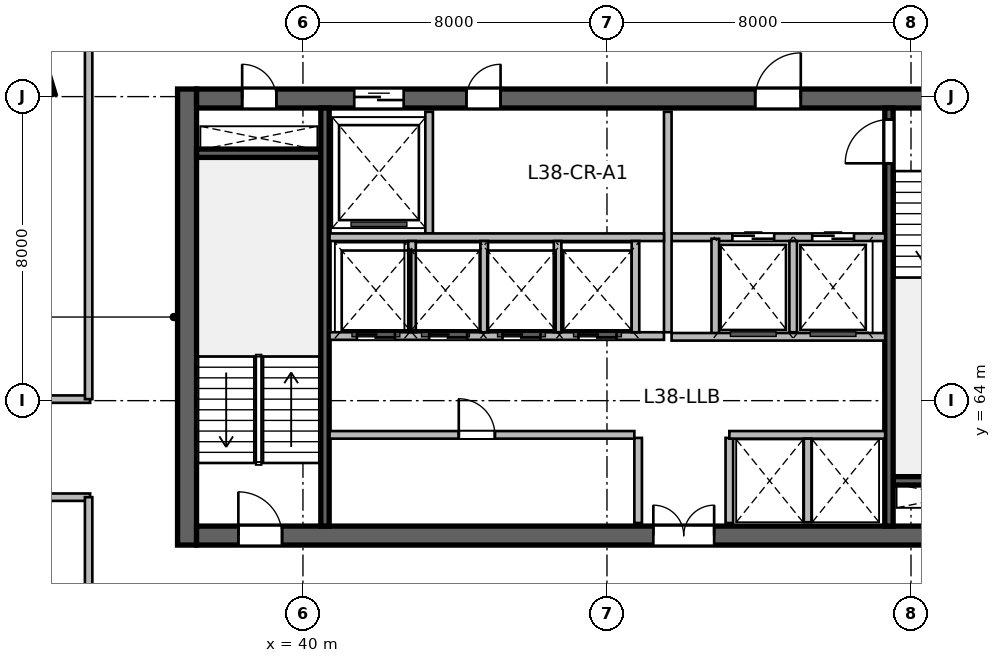
"""IFC4 building model, lengths in metres.
Left out: names, types, materials, properties, quantities, classifications, styles, units other than length and angle.
Written with IfcOpenShell. Run it as: python <this file> out.ifc"""

import sys

from ifc_helpers import new_model, si_unit, direction, frame, frame_2d, origin, origin_2d, place, context, subcontext, project, spatial, rectangle, extrude, source, transform, mapped, element, fill, save


model = new_model("IFC4")
c1 = context("Model", 3, precision=1e-05, world=origin(), true_north=direction((0.0, 1.0)))
c2 = subcontext(c1, "Body", "Model", "MODEL_VIEW")
j1 = project(units=[si_unit("LENGTHUNIT", "METRE"), si_unit("PLANEANGLEUNIT", "RADIAN")], contexts=[c1])
p1 = place(None, origin())
s1 = spatial("IfcSite", under=j1, at=p1, CompositionType="ELEMENT")
p2 = place(p1, origin())
s2 = spatial("IfcBuilding", under=s1, at=p2, CompositionType="ELEMENT")
p3 = place(p2, frame((0.0, 0.0, 158.4)))
s3 = spatial("IfcBuildingStorey", under=s2, at=p3, CompositionType="ELEMENT", Elevation=158.4)
m1 = source(origin(), c2, "Body", "SweptSolid", [
    extrude(rectangle(XDim=12.0, YDim=0.5, at=frame_2d((6.0, 0.0))), origin(), (0.0, 0.0, 1.0), 3.9),
])
p4 = place(p3, frame((36.95, 60.2, 0.0), z_axis=(0.0, 0.0, 1.0), x_axis=(0.0, 1.0, 0.0)))
e1 = element("IfcWall", 1, at=p4, inside=s3, PredefinedType="SHEAR", context=c2, shape_type="MappedRepresentation", body=[
    mapped(m1, transform((0.0, 0.0, 0.0), scale=1.0)),
])
m2 = source(origin(), c2, "Body", "SweptSolid", [
    extrude(rectangle(XDim=21.6, YDim=0.5, at=frame_2d((10.8, 0.0))), origin(), (0.0, 0.0, 1.0), 3.9),
])
p5 = place(p3, frame((37.2, 60.45, 0.0), z_axis=(0.0, 0.0, 1.0), x_axis=(1.0, 0.0, 0.0)))
e2 = element("IfcWall", 2, at=p5, inside=s3, PredefinedType="SHEAR", context=c2, shape_type="MappedRepresentation", body=[
    mapped(m2, transform((0.0, 0.0, 0.0), scale=1.0)),
])
p6 = place(p5, frame((1.1, 0.0, 0.0)))
e3 = element("IfcOpeningElement", 3, at=p6, cuts=e2, PredefinedType="OPENING", context=c2, shape_type="SweptSolid", body=[
    extrude(rectangle(XDim=1.15, YDim=2.15, at=frame_2d((0.575, 1.075))), frame((0.0, 0.26, 0.0), z_axis=(0.0, -1.0, 0.0), x_axis=(1.0, 0.0, 0.0)), (0.0, 0.0, 1.0), 0.52),
])
p7 = place(p5, frame((19.5, 0.0, 0.0)))
e4 = element("IfcOpeningElement", 4, at=p7, cuts=e2, PredefinedType="OPENING", context=c2, shape_type="SweptSolid", body=[
    extrude(rectangle(XDim=0.9, YDim=2.1, at=frame_2d((0.45, 1.05))), frame((0.0, 0.26, 0.0), z_axis=(0.0, -1.0, 0.0), x_axis=(1.0, 0.0, 0.0)), (0.0, 0.0, 1.0), 0.52),
])
p8 = place(p5, frame((12.02, 0.0, 0.0)))
e5 = element("IfcOpeningElement", 5, at=p8, cuts=e2, PredefinedType="OPENING", context=c2, shape_type="SweptSolid", body=[
    extrude(rectangle(XDim=1.6, YDim=2.15, at=frame_2d((0.8, 1.075))), frame((0.0, 0.26, 0.0), z_axis=(0.0, -1.0, 0.0), x_axis=(1.0, 0.0, 0.0)), (0.0, 0.0, 1.0), 0.52),
])
p9 = place(p3, frame((37.2, 71.95, 0.0), z_axis=(0.0, 0.0, 1.0), x_axis=(1.0, 0.0, 0.0)))
e6 = element("IfcWall", 6, at=p9, inside=s3, PredefinedType="SHEAR", context=c2, shape_type="MappedRepresentation", body=[
    mapped(m2, transform((0.0, 0.0, 0.0), scale=1.0)),
])
p10 = place(p9, frame((1.2, 0.0, 0.0)))
e7 = element("IfcOpeningElement", 7, at=p10, cuts=e6, PredefinedType="OPENING", context=c2, shape_type="SweptSolid", body=[
    extrude(rectangle(XDim=0.9, YDim=2.1, at=frame_2d((0.45, 1.05))), frame((0.0, 0.26, 0.0), z_axis=(0.0, -1.0, 0.0), x_axis=(1.0, 0.0, 0.0)), (0.0, 0.0, 1.0), 0.52),
])
p11 = place(p9, frame((14.7, 0.0, 0.0)))
e8 = element("IfcOpeningElement", 8, at=p11, cuts=e6, PredefinedType="OPENING", context=c2, shape_type="SweptSolid", body=[
    extrude(rectangle(XDim=1.2, YDim=2.15, at=frame_2d((0.6, 1.075))), frame((0.0, 0.26, 0.0), z_axis=(0.0, -1.0, 0.0), x_axis=(1.0, 0.0, 0.0)), (0.0, 0.0, 1.0), 0.52),
])
p12 = place(p9, frame((4.15, 0.0, 0.0)))
e9 = element("IfcOpeningElement", 9, at=p12, cuts=e6, PredefinedType="OPENING", context=c2, shape_type="SweptSolid", body=[
    extrude(rectangle(XDim=1.3, YDim=2.15, at=frame_2d((0.65, 1.075))), frame((0.0, 0.26, 0.0), z_axis=(0.0, -1.0, 0.0), x_axis=(1.0, 0.0, 0.0)), (0.0, 0.0, 1.0), 0.52),
])
p13 = place(p9, frame((7.1, 0.0, 0.0)))
e10 = element("IfcOpeningElement", 10, at=p13, cuts=e6, PredefinedType="OPENING", context=c2, shape_type="SweptSolid", body=[
    extrude(rectangle(XDim=0.9, YDim=2.1, at=frame_2d((0.45, 1.05))), frame((0.0, 0.26, 0.0), z_axis=(0.0, -1.0, 0.0), x_axis=(1.0, 0.0, 0.0)), (0.0, 0.0, 1.0), 0.52),
])
m3 = source(origin(), c2, "Body", "SweptSolid", [
    extrude(rectangle(XDim=3.27, YDim=0.22, at=frame_2d((1.635, 0.0))), origin(), (0.0, 0.0, 1.0), 3.9),
])
for number, where, z_axis, x_axis in (
    (11, (37.2, 70.51, 0.0), (0.0, 0.0, 1.0), (1.0, 0.0, 0.0)),
    (12, (55.53, 61.89, 0.0), (0.0, 0.0, 1.0), (1.0, 0.0, 0.0)),
):
    element("IfcWall", number, at=place(p3, frame(where, z_axis=z_axis, x_axis=x_axis)), inside=s3, PredefinedType="SHEAR", context=c2, shape_type="MappedRepresentation", body=[
        mapped(m3, transform((0.0, 0.0, 0.0), scale=1.0)),
    ])
m4 = source(origin(), c2, "Body", "SweptSolid", [
    extrude(rectangle(XDim=11.0, YDim=0.22, at=frame_2d((5.5, 0.0))), origin(), (0.0, 0.0, 1.0), 3.9),
])
p14 = place(p3, frame((40.58, 60.7, 0.0), z_axis=(0.0, 0.0, 1.0), x_axis=(0.0, 1.0, 0.0)))
e13 = element("IfcWall", 13, at=p14, inside=s3, PredefinedType="SHEAR", context=c2, shape_type="MappedRepresentation", body=[
    mapped(m4, transform((0.0, 0.0, 0.0), scale=1.0)),
])
p15 = place(p3, frame((55.42, 60.7, 0.0), z_axis=(0.0, 0.0, 1.0), x_axis=(0.0, 1.0, 0.0)))
e14 = element("IfcWall", 14, at=p15, inside=s3, PredefinedType="SHEAR", context=c2, shape_type="MappedRepresentation", body=[
    mapped(m4, transform((0.0, 0.0, 0.0), scale=1.0)),
])
p16 = place(p15, frame((9.545, 0.0, 0.0)))
e15 = element("IfcOpeningElement", 15, at=p16, cuts=e14, PredefinedType="OPENING", context=c2, shape_type="SweptSolid", body=[
    extrude(rectangle(XDim=1.15, YDim=2.15, at=frame_2d((0.575, 1.075))), frame((0.0, 0.12, 0.0), z_axis=(0.0, -1.0, 0.0), x_axis=(1.0, 0.0, 0.0)), (0.0, 0.0, 1.0), 0.24),
])
m5 = source(origin(), c2, "Body", "SweptSolid", [
    extrude(rectangle(XDim=1.1, YDim=1.1, at=origin_2d()), origin(), (0.0, 0.0, 1.0), 3.9),
])
p17 = place(p3, frame((32.791, 72.442, 0.0), z_axis=(0.0, 0.0, 1.0), x_axis=(-0.288697611798, 0.957420330337, 0.0)))
e16 = element("IfcColumn", 16, at=p17, inside=s3, PredefinedType="COLUMN", context=c2, shape_type="MappedRepresentation", body=[
    mapped(m5, transform((0.0, 0.0, 0.0), scale=1.0)),
])
m6 = source(origin(), c2, "Body", "SweptSolid", [
    extrude(rectangle(XDim=4.384, YDim=0.28, at=frame_2d((2.192, 0.0))), origin(), (0.0, 0.0, 1.0), 3.65),
])
p18 = place(p3, frame((31.702, 73.08, 0.0), z_axis=(0.0, 0.0, 1.0), x_axis=(0.895969968053, 0.444114643248, 0.0)))
e17 = element("IfcWall", 17, at=p18, inside=s3, PredefinedType="SOLIDWALL", context=c2, shape_type="MappedRepresentation", body=[
    mapped(m6, transform((0.0, 0.0, 0.0), scale=1.0)),
])
m7 = source(origin(), c2, "Body", "SweptSolid", [
    extrude(rectangle(XDim=2.24, YDim=0.2, at=frame_2d((1.12, 0.0))), origin(), (0.0, 0.0, 1.0), 3.65),
])
for number, where, z_axis, x_axis in (
    (18, (48.82, 60.78, 0.0), (0.0, 0.0, 1.0), (0.0, 1.0, 0.0)),
    (19, (51.22, 60.78, 0.0), (0.0, 0.0, 1.0), (0.0, 1.0, 0.0)),
):
    element("IfcWall", number, at=place(p3, frame(where, z_axis=z_axis, x_axis=x_axis)), inside=s3, PredefinedType="SOLIDWALL", context=c2, shape_type="MappedRepresentation", body=[
        mapped(m7, transform((0.0, 0.0, 0.0), scale=1.0)),
    ])
m8 = source(origin(), c2, "Body", "SweptSolid", [
    extrude(rectangle(XDim=5.62, YDim=0.2, at=frame_2d((2.81, 0.0))), origin(), (0.0, 0.0, 1.0), 3.65),
])
p19 = place(p3, frame((49.7, 68.3, 0.0), z_axis=(0.0, 0.0, 1.0), x_axis=(1.0, 0.0, 0.0)))
e20 = element("IfcWall", 20, at=p19, inside=s3, PredefinedType="SOLIDWALL", context=c2, shape_type="MappedRepresentation", body=[
    mapped(m8, transform((0.0, 0.0, 0.0), scale=1.0)),
])
p20 = place(p19, frame((1.6, 0.0, 0.0)))
e21 = element("IfcOpeningElement", 21, at=p20, cuts=e20, PredefinedType="OPENING", context=c2, shape_type="SweptSolid", body=[
    extrude(rectangle(XDim=1.1, YDim=2.15, at=frame_2d((0.55, 1.075))), frame((0.0, 0.11, 0.0), z_axis=(0.0, -1.0, 0.0), x_axis=(1.0, 0.0, 0.0)), (0.0, 0.0, 1.0), 0.22),
])
p21 = place(p19, frame((3.7, 0.0, 0.0)))
e22 = element("IfcOpeningElement", 22, at=p21, cuts=e20, PredefinedType="OPENING", context=c2, shape_type="SweptSolid", body=[
    extrude(rectangle(XDim=1.1, YDim=2.15, at=frame_2d((0.55, 1.075))), frame((0.0, 0.11, 0.0), z_axis=(0.0, -1.0, 0.0), x_axis=(1.0, 0.0, 0.0)), (0.0, 0.0, 1.0), 0.22),
])
m9 = source(origin(), c2, "Body", "SweptSolid", [
    extrude(rectangle(XDim=5.8, YDim=0.2, at=frame_2d((2.9, 0.0))), origin(), (0.0, 0.0, 1.0), 3.65),
])
p22 = place(p3, frame((49.6, 65.8, 0.0), z_axis=(0.0, 0.0, 1.0), x_axis=(0.0, 1.0, 0.0)))
e23 = element("IfcWall", 23, at=p22, inside=s3, PredefinedType="SOLIDWALL", context=c2, shape_type="MappedRepresentation", body=[
    mapped(m9, transform((0.0, 0.0, 0.0), scale=1.0)),
])
m10 = source(origin(), c2, "Body", "SweptSolid", [
    extrude(rectangle(XDim=2.58, YDim=0.2, at=frame_2d((1.29, 0.0))), origin(), (0.0, 0.0, 1.0), 3.65),
])
p23 = place(p3, frame((50.85, 65.68, 0.0), z_axis=(0.0, 0.0, 1.0), x_axis=(0.0, 1.0, 0.0)))
e24 = element("IfcWall", 24, at=p23, inside=s3, PredefinedType="SOLIDWALL", context=c2, shape_type="MappedRepresentation", body=[
    mapped(m10, transform((0.0, 0.0, 0.0), scale=1.0)),
])
m11 = source(origin(), c2, "Body", "SweptSolid", [
    extrude(rectangle(XDim=2.4, YDim=0.2, at=frame_2d((1.2, 0.0))), origin(), (0.0, 0.0, 1.0), 3.65),
])
p24 = place(p3, frame((52.9, 65.8, 0.0), z_axis=(0.0, 0.0, 1.0), x_axis=(0.0, 1.0, 0.0)))
e25 = element("IfcWall", 25, at=p24, inside=s3, PredefinedType="SOLIDWALL", context=c2, shape_type="MappedRepresentation", body=[
    mapped(m11, transform((0.0, 0.0, 0.0), scale=1.0)),
])
p25 = place(p3, frame((49.7, 65.68, 0.0), z_axis=(0.0, 0.0, 1.0), x_axis=(1.0, 0.0, 0.0)))
e26 = element("IfcWall", 26, at=p25, inside=s3, PredefinedType="SOLIDWALL", context=c2, shape_type="MappedRepresentation", body=[
    mapped(m8, transform((0.0, 0.0, 0.0), scale=1.0)),
])
m12 = source(origin(), c2, "Body", "SweptSolid", [
    extrude(rectangle(XDim=3.2, YDim=0.2, at=frame_2d((1.6, 0.0))), origin(), (0.0, 0.0, 1.0), 3.65),
])
p26 = place(p3, frame((43.32, 68.4, 0.0), z_axis=(0.0, 0.0, 1.0), x_axis=(0.0, 1.0, 0.0)))
e27 = element("IfcWall", 27, at=p26, inside=s3, PredefinedType="SOLIDWALL", context=c2, shape_type="MappedRepresentation", body=[
    mapped(m12, transform((0.0, 0.0, 0.0), scale=1.0)),
])
m13 = source(origin(), c2, "Body", "SweptSolid", [
    extrude(rectangle(XDim=8.8, YDim=0.2, at=frame_2d((4.4, 0.0))), origin(), (0.0, 0.0, 1.0), 3.65),
])
p27 = place(p3, frame((40.7, 68.3, 0.0), z_axis=(0.0, 0.0, 1.0), x_axis=(1.0, 0.0, 0.0)))
e28 = element("IfcWall", 28, at=p27, inside=s3, PredefinedType="SOLIDWALL", context=c2, shape_type="MappedRepresentation", body=[
    mapped(m13, transform((0.0, 0.0, 0.0), scale=1.0)),
])
m14 = source(origin(), c2, "Body", "SweptSolid", [
    extrude(rectangle(XDim=8.02, YDim=0.2, at=frame_2d((4.01, 0.0))), origin(), (0.0, 0.0, 1.0), 3.65),
])
p28 = place(p3, frame((40.7, 63.1, 0.0), z_axis=(0.0, 0.0, 1.0), x_axis=(1.0, 0.0, 0.0)))
e29 = element("IfcWall", 29, at=p28, inside=s3, PredefinedType="SOLIDWALL", context=c2, shape_type="MappedRepresentation", body=[
    mapped(m14, transform((0.0, 0.0, 0.0), scale=1.0)),
])
p29 = place(p28, frame((3.4, 0.0, 0.0)))
e30 = element("IfcOpeningElement", 30, at=p29, cuts=e29, PredefinedType="OPENING", context=c2, shape_type="SweptSolid", body=[
    extrude(rectangle(XDim=0.95, YDim=2.15, at=frame_2d((0.475, 1.075))), frame((0.0, 0.11, 0.0), z_axis=(0.0, -1.0, 0.0), x_axis=(1.0, 0.0, 0.0)), (0.0, 0.0, 1.0), 0.22),
])
m15 = source(origin(), c2, "Body", "SweptSolid", [
    extrude(rectangle(XDim=4.1, YDim=0.2, at=frame_2d((2.05, 0.0))), origin(), (0.0, 0.0, 1.0), 3.65),
])
p30 = place(p3, frame((51.22, 63.1, 0.0), z_axis=(0.0, 0.0, 1.0), x_axis=(1.0, 0.0, 0.0)))
e31 = element("IfcWall", 31, at=p30, inside=s3, PredefinedType="SOLIDWALL", context=c2, shape_type="MappedRepresentation", body=[
    mapped(m15, transform((0.0, 0.0, 0.0), scale=1.0)),
])
m16 = source(origin(), c2, "Body", "SweptSolid", [
    extrude(rectangle(XDim=2.2, YDim=0.2, at=frame_2d((1.1, 0.0))), origin(), (0.0, 0.0, 1.0), 3.65),
])
p31 = place(p3, frame((53.28, 60.8, 0.0), z_axis=(0.0, 0.0, 1.0), x_axis=(0.0, 1.0, 0.0)))
e32 = element("IfcWall", 32, at=p31, inside=s3, PredefinedType="SOLIDWALL", context=c2, shape_type="MappedRepresentation", body=[
    mapped(m16, transform((0.0, 0.0, 0.0), scale=1.0)),
])
p32 = place(p3, frame((40.7, 65.7, 0.0), z_axis=(0.0, 0.0, 1.0), x_axis=(1.0, 0.0, 0.0)))
e33 = element("IfcWall", 33, at=p32, inside=s3, PredefinedType="SOLIDWALL", context=c2, shape_type="MappedRepresentation", body=[
    mapped(m13, transform((0.0, 0.0, 0.0), scale=1.0)),
])
p33 = place(p32, frame((0.72, 0.0, 0.0)))
e34 = element("IfcOpeningElement", 34, at=p33, cuts=e33, PredefinedType="OPENING", context=c2, shape_type="SweptSolid", body=[
    extrude(rectangle(XDim=1.0, YDim=2.15, at=frame_2d((0.5, 1.075))), frame((0.0, 0.11, 0.0), z_axis=(0.0, -1.0, 0.0), x_axis=(1.0, 0.0, 0.0)), (0.0, 0.0, 1.0), 0.22),
])
p34 = place(p32, frame((2.62, 0.0, 0.0)))
e35 = element("IfcOpeningElement", 35, at=p34, cuts=e33, PredefinedType="OPENING", context=c2, shape_type="SweptSolid", body=[
    extrude(rectangle(XDim=1.0, YDim=2.15, at=frame_2d((0.5, 1.075))), frame((0.0, 0.11, 0.0), z_axis=(0.0, -1.0, 0.0), x_axis=(1.0, 0.0, 0.0)), (0.0, 0.0, 1.0), 0.22),
])
p35 = place(p32, frame((4.55, 0.0, 0.0)))
e36 = element("IfcOpeningElement", 36, at=p35, cuts=e33, PredefinedType="OPENING", context=c2, shape_type="SweptSolid", body=[
    extrude(rectangle(XDim=1.0, YDim=2.15, at=frame_2d((0.5, 1.075))), frame((0.0, 0.11, 0.0), z_axis=(0.0, -1.0, 0.0), x_axis=(1.0, 0.0, 0.0)), (0.0, 0.0, 1.0), 0.22),
])
p36 = place(p32, frame((6.55, 0.0, 0.0)))
e37 = element("IfcOpeningElement", 37, at=p36, cuts=e33, PredefinedType="OPENING", context=c2, shape_type="SweptSolid", body=[
    extrude(rectangle(XDim=1.0, YDim=2.15, at=frame_2d((0.5, 1.075))), frame((0.0, 0.11, 0.0), z_axis=(0.0, -1.0, 0.0), x_axis=(1.0, 0.0, 0.0)), (0.0, 0.0, 1.0), 0.22),
])
for number, where, z_axis, x_axis in (
    (38, (48.75, 65.8, 0.0), (0.0, 0.0, 1.0), (0.0, 1.0, 0.0)),
    (39, (42.87, 65.8, 0.0), (0.0, 0.0, 1.0), (0.0, 1.0, 0.0)),
    (40, (44.77, 65.8, 0.0), (0.0, 0.0, 1.0), (0.0, 1.0, 0.0)),
    (41, (46.7, 65.8, 0.0), (0.0, 0.0, 1.0), (0.0, 1.0, 0.0)),
):
    element("IfcWall", number, at=place(p3, frame(where, z_axis=z_axis, x_axis=x_axis)), inside=s3, PredefinedType="SOLIDWALL", context=c2, shape_type="MappedRepresentation", body=[
        mapped(m11, transform((0.0, 0.0, 0.0), scale=1.0)),
    ])
m17 = source(origin(), c2, "Body", "SweptSolid", [
    extrude(rectangle(XDim=11.22, YDim=0.195, at=frame_2d((5.61, 0.0))), origin(), (0.0, 0.0, 1.0), 3.65),
])
p37 = place(p3, frame((23.18, 64.04, 0.0), z_axis=(0.0, 0.0, 1.0), x_axis=(1.0, 0.0, 0.0)))
e42 = element("IfcWall", 42, at=p37, inside=s3, PredefinedType="PARTITIONING", context=c2, shape_type="MappedRepresentation", body=[
    mapped(m17, transform((0.0, 0.0, 0.0), scale=1.0)),
])
p38 = place(p37, frame((5.135, 0.0, 0.0)))
e43 = element("IfcOpeningElement", 43, at=p38, cuts=e42, PredefinedType="OPENING", context=c2, shape_type="SweptSolid", body=[
    extrude(rectangle(XDim=0.95, YDim=2.1, at=frame_2d((0.475, 1.05))), frame((0.0, 0.107, 0.0), z_axis=(0.0, -1.0, 0.0), x_axis=(1.0, 0.0, 0.0)), (0.0, 0.0, 1.0), 0.215),
])
p39 = place(p3, frame((23.18, 61.46, 0.0), z_axis=(0.0, 0.0, 1.0), x_axis=(1.0, 0.0, 0.0)))
e44 = element("IfcWall", 44, at=p39, inside=s3, PredefinedType="PARTITIONING", context=c2, shape_type="MappedRepresentation", body=[
    mapped(m17, transform((0.0, 0.0, 0.0), scale=1.0)),
])
p40 = place(p39, frame((5.135, 0.0, 0.0)))
e45 = element("IfcOpeningElement", 45, at=p40, cuts=e44, PredefinedType="OPENING", context=c2, shape_type="SweptSolid", body=[
    extrude(rectangle(XDim=0.95, YDim=2.1, at=frame_2d((0.475, 1.05))), frame((0.0, 0.107, 0.0), z_axis=(0.0, -1.0, 0.0), x_axis=(1.0, 0.0, 0.0)), (0.0, 0.0, 1.0), 0.215),
])
m18 = source(origin(), c2, "Body", "SweptSolid", [
    extrude(rectangle(XDim=12.126, YDim=0.195, at=frame_2d((6.063, 0.0))), origin(), (0.0, 0.0, 1.0), 3.65),
])
p41 = place(p3, frame((34.36, 49.334, 0.0), z_axis=(0.0, 0.0, 1.0), x_axis=(0.0, 1.0, 0.0)))
e46 = element("IfcWall", 46, at=p41, inside=s3, PredefinedType="PARTITIONING", context=c2, shape_type="MappedRepresentation", body=[
    mapped(m18, transform((0.0, 0.0, 0.0), scale=1.0)),
])
m19 = source(origin(), c2, "Body", "SweptSolid", [
    extrude(rectangle(XDim=10.346, YDim=0.195, at=frame_2d((5.173, 0.0))), origin(), (0.0, 0.0, 1.0), 3.65),
])
p42 = place(p3, frame((34.36, 64.04, 0.0), z_axis=(0.0, 0.0, 1.0), x_axis=(0.0, 1.0, 0.0)))
e47 = element("IfcWall", 47, at=p42, inside=s3, PredefinedType="PARTITIONING", context=c2, shape_type="MappedRepresentation", body=[
    mapped(m19, transform((0.0, 0.0, 0.0), scale=1.0)),
])
m20 = source(origin(), c2, "Body", "SweptSolid", [
    extrude(rectangle(XDim=1.15, YDim=2.15, at=frame_2d((0.575, 1.075))), frame((0.0, 0.025, 0.0), z_axis=(0.0, -1.0, 0.0), x_axis=(1.0, 0.0, 0.0)), (0.0, 0.0, 1.0), 0.05),
])
p43 = place(p6, origin())
e48 = element("IfcDoor", 48, at=p43, inside=s3, OperationType="SINGLE_SWING_LEFT", PredefinedType="DOOR", context=c2, shape_type="MappedRepresentation", body=[
    mapped(m20, transform((0.0, 0.0, 0.0), scale=1.0)),
])
fill(e3, e48)
m21 = source(origin(), c2, "Body", "SweptSolid", [
    extrude(rectangle(XDim=0.9, YDim=2.1, at=frame_2d((0.45, 1.05))), frame((0.0, 0.025, 0.0), z_axis=(0.0, -1.0, 0.0), x_axis=(1.0, 0.0, 0.0)), (0.0, 0.0, 1.0), 0.05),
])
p44 = place(p10, origin())
e49 = element("IfcDoor", 49, at=p44, inside=s3, OperationType="SINGLE_SWING_LEFT", PredefinedType="DOOR", context=c2, shape_type="MappedRepresentation", body=[
    mapped(m21, transform((0.0, 0.0, 0.0), scale=1.0)),
])
fill(e7, e49)
p45 = place(p16, origin())
e50 = element("IfcDoor", 50, at=p45, inside=s3, OperationType="SINGLE_SWING_LEFT", PredefinedType="DOOR", context=c2, shape_type="MappedRepresentation", body=[
    mapped(m20, transform((0.0, 0.0, 0.0), scale=1.0)),
])
fill(e15, e50)
m22 = source(origin(), c2, "Body", "SweptSolid", [
    extrude(rectangle(XDim=1.6, YDim=2.15, at=frame_2d((0.8, 1.075))), frame((0.0, 0.025, 0.0), z_axis=(0.0, -1.0, 0.0), x_axis=(1.0, 0.0, 0.0)), (0.0, 0.0, 1.0), 0.05),
])
p46 = place(p8, origin())
e51 = element("IfcDoor", 51, at=p46, inside=s3, OperationType="DOUBLE_DOOR_SINGLE_SWING", PredefinedType="DOOR", context=c2, shape_type="MappedRepresentation", body=[
    mapped(m22, transform((0.0, 0.0, 0.0), scale=1.0)),
])
fill(e5, e51)
m23 = source(origin(), c2, "Body", "SweptSolid", [
    extrude(rectangle(XDim=1.2, YDim=2.15, at=frame_2d((0.6, 1.075))), frame((0.0, 0.025, 0.0), z_axis=(0.0, -1.0, 0.0), x_axis=(1.0, 0.0, 0.0)), (0.0, 0.0, 1.0), 0.05),
])
p47 = place(p11, origin())
e52 = element("IfcDoor", 52, at=p47, inside=s3, OperationType="SINGLE_SWING_RIGHT", PredefinedType="DOOR", context=c2, shape_type="MappedRepresentation", body=[
    mapped(m23, transform((0.0, 0.0, 0.0), scale=1.0)),
])
fill(e8, e52)
m24 = source(origin(), c2, "Body", "SweptSolid", [
    extrude(rectangle(XDim=1.1, YDim=2.15, at=frame_2d((0.55, 1.075))), frame((0.0, 0.025, 0.0), z_axis=(0.0, -1.0, 0.0), x_axis=(1.0, 0.0, 0.0)), (0.0, 0.0, 1.0), 0.05),
])
p48 = place(p20, origin())
e53 = element("IfcDoor", 53, at=p48, inside=s3, OperationType="DOUBLE_DOOR_SLIDING", PredefinedType="DOOR", context=c2, shape_type="MappedRepresentation", body=[
    mapped(m24, transform((0.0, 0.0, 0.0), scale=1.0)),
])
fill(e21, e53)
p49 = place(p21, origin())
e54 = element("IfcDoor", 54, at=p49, inside=s3, OperationType="DOUBLE_DOOR_SLIDING", PredefinedType="DOOR", context=c2, shape_type="MappedRepresentation", body=[
    mapped(m24, transform((0.0, 0.0, 0.0), scale=1.0)),
])
fill(e22, e54)
m25 = source(origin(), c2, "Body", "SweptSolid", [
    extrude(rectangle(XDim=1.3, YDim=2.15, at=frame_2d((0.65, 1.075))), frame((0.0, 0.025, 0.0), z_axis=(0.0, -1.0, 0.0), x_axis=(1.0, 0.0, 0.0)), (0.0, 0.0, 1.0), 0.05),
])
p50 = place(p12, origin())
e55 = element("IfcDoor", 55, at=p50, inside=s3, OperationType="DOUBLE_DOOR_SLIDING", PredefinedType="DOOR", context=c2, shape_type="MappedRepresentation", body=[
    mapped(m25, transform((0.0, 0.0, 0.0), scale=1.0)),
])
fill(e9, e55)
p51 = place(p13, origin())
e56 = element("IfcDoor", 56, at=p51, inside=s3, OperationType="SINGLE_SWING_RIGHT", PredefinedType="DOOR", context=c2, shape_type="MappedRepresentation", body=[
    mapped(m21, transform((0.0, 0.0, 0.0), scale=1.0)),
])
fill(e10, e56)
m26 = source(origin(), c2, "Body", "SweptSolid", [
    extrude(rectangle(XDim=0.95, YDim=2.15, at=frame_2d((0.475, 1.075))), frame((0.0, 0.025, 0.0), z_axis=(0.0, -1.0, 0.0), x_axis=(1.0, 0.0, 0.0)), (0.0, 0.0, 1.0), 0.05),
])
p52 = place(p29, origin())
e57 = element("IfcDoor", 57, at=p52, inside=s3, OperationType="SINGLE_SWING_LEFT", PredefinedType="DOOR", context=c2, shape_type="MappedRepresentation", body=[
    mapped(m26, transform((0.0, 0.0, 0.0), scale=1.0)),
])
fill(e30, e57)
m27 = source(origin(), c2, "Body", "SweptSolid", [
    extrude(rectangle(XDim=1.0, YDim=2.15, at=frame_2d((0.5, 1.075))), frame((0.0, 0.025, 0.0), z_axis=(0.0, -1.0, 0.0), x_axis=(1.0, 0.0, 0.0)), (0.0, 0.0, 1.0), 0.05),
])
p53 = place(p33, origin())
e58 = element("IfcDoor", 58, at=p53, inside=s3, OperationType="DOUBLE_DOOR_SLIDING", PredefinedType="DOOR", context=c2, shape_type="MappedRepresentation", body=[
    mapped(m27, transform((0.0, 0.0, 0.0), scale=1.0)),
])
fill(e34, e58)
p54 = place(p34, origin())
e59 = element("IfcDoor", 59, at=p54, inside=s3, OperationType="DOUBLE_DOOR_SLIDING", PredefinedType="DOOR", context=c2, shape_type="MappedRepresentation", body=[
    mapped(m27, transform((0.0, 0.0, 0.0), scale=1.0)),
])
fill(e35, e59)
p55 = place(p35, origin())
e60 = element("IfcDoor", 60, at=p55, inside=s3, OperationType="DOUBLE_DOOR_SLIDING", PredefinedType="DOOR", context=c2, shape_type="MappedRepresentation", body=[
    mapped(m27, transform((0.0, 0.0, 0.0), scale=1.0)),
])
fill(e36, e60)
p56 = place(p36, origin())
e61 = element("IfcDoor", 61, at=p56, inside=s3, OperationType="DOUBLE_DOOR_SLIDING", PredefinedType="DOOR", context=c2, shape_type="MappedRepresentation", body=[
    mapped(m27, transform((0.0, 0.0, 0.0), scale=1.0)),
])
fill(e37, e61)
save(model, sys.argv[1])
